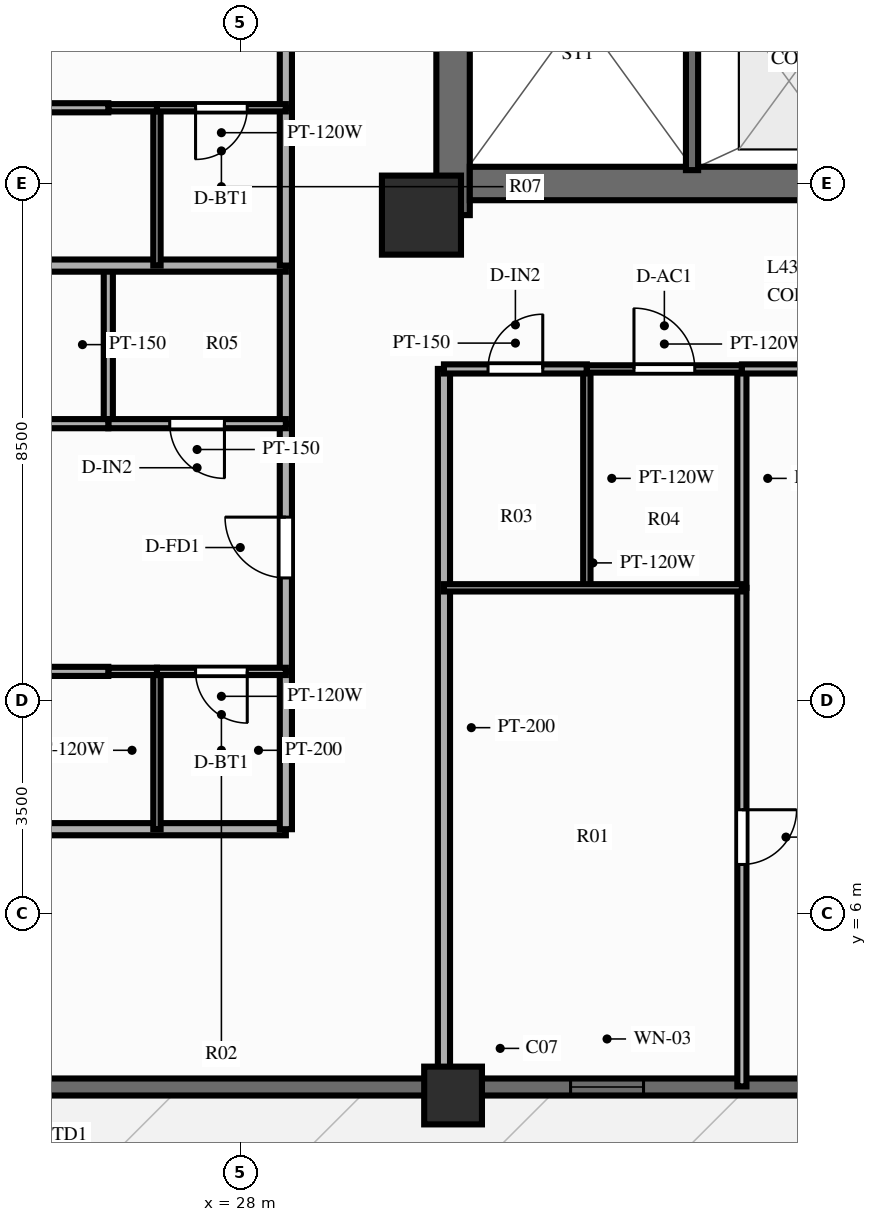
"""IFC4 building model, lengths in metres.
Left out: names, types, materials, properties, quantities, classifications, styles, units other than length and angle.
Written with IfcOpenShell. Run it as: python <this file> out.ifc"""

import sys

from ifc_helpers import new_model, si_unit, direction, frame, frame_2d, origin, origin_2d, place, context, subcontext, project, spatial, rectangle, extrude, source, transform, mapped, element, fill, save


model = new_model("IFC4")
c1 = context("Model", 3, precision=1e-05, world=origin(), true_north=direction((0.0, 1.0)))
c2 = subcontext(c1, "Body", "Model", "MODEL_VIEW")
j1 = project(units=[si_unit("LENGTHUNIT", "METRE"), si_unit("PLANEANGLEUNIT", "RADIAN")], contexts=[c1])
p1 = place(None, origin())
s1 = spatial("IfcSite", under=j1, at=p1, CompositionType="ELEMENT")
p2 = place(p1, origin())
s2 = spatial("IfcBuilding", under=s1, at=p2, CompositionType="ELEMENT")
p3 = place(p2, frame((0.0, 0.0, 135.75)))
s3 = spatial("IfcBuildingStorey", under=s2, at=p3, CompositionType="ELEMENT", Elevation=135.75)
p4 = place(p3, frame((31.5, 17.48, 0.0), z_axis=(0.0, 0.0, 1.0), x_axis=(0.0, 1.0, 0.0)))
e1 = element("IfcWall", 1, at=p4, inside=s3, PredefinedType="SHEAR", context=c2, shape_type="SweptSolid", body=[
    extrude(rectangle(XDim=19.04, YDim=0.55, at=frame_2d((9.52, 0.0))), origin(), (0.0, 0.0, 1.0), 3.0),
])
p5 = place(p4, frame((6.32, 0.0, 0.0)))
e2 = element("IfcOpeningElement", 2, at=p5, cuts=e1, PredefinedType="OPENING", context=c2, shape_type="SweptSolid", body=[
    extrude(rectangle(XDim=1.1, YDim=2.15, at=frame_2d((0.55, 1.075))), frame((0.0, 0.287, 0.0), z_axis=(0.0, -1.0, 0.0), x_axis=(1.0, 0.0, 0.0)), (0.0, 0.0, 1.0), 0.574),
])
p6 = place(p3, frame((31.775, 18.0, 0.0), z_axis=(0.0, 0.0, 1.0), x_axis=(1.0, 0.0, 0.0)))
e3 = element("IfcWall", 3, at=p6, inside=s3, PredefinedType="SHEAR", context=c2, shape_type="SweptSolid", body=[
    extrude(rectangle(XDim=12.45, YDim=0.55, at=frame_2d((6.225, 0.0))), origin(), (0.0, 0.0, 1.0), 3.0),
])
m1 = source(origin(), c2, "Body", "SweptSolid", [
    extrude(rectangle(XDim=1.3, YDim=1.3, at=origin_2d()), origin(), (0.0, 0.0, 1.0), 3.0),
])
p7 = place(p3, frame((30.98, 17.48, 0.0), z_axis=(0.0, 0.0, 1.0), x_axis=(1.0, 0.0, 0.0)))
e4 = element("IfcColumn", 4, at=p7, inside=s3, PredefinedType="COLUMN", context=c2, shape_type="MappedRepresentation", body=[
    mapped(m1, transform((0.0, 0.0, 0.0), scale=1.0)),
])
m2 = source(origin(), c2, "Body", "SweptSolid", [
    extrude(rectangle(XDim=0.95, YDim=0.95, at=origin_2d()), origin(), (0.0, 0.0, 1.0), 3.0),
])
p8 = place(p3, frame((31.5, 3.0, 0.0), z_axis=(0.0, 0.0, 1.0), x_axis=(1.0, 0.0, 0.0)))
e5 = element("IfcColumn", 5, at=p8, inside=s3, PredefinedType="COLUMN", context=c2, shape_type="MappedRepresentation", body=[
    mapped(m2, transform((0.0, 0.0, 0.0), scale=1.0)),
])
p9 = place(p3, frame((16.2, 3.14, 0.0), z_axis=(0.0, 0.0, 1.0), x_axis=(1.0, 0.0, 0.0)))
e6 = element("IfcWall", 6, at=p9, inside=s3, PredefinedType="SOLIDWALL", context=c2, shape_type="SweptSolid", body=[
    extrude(rectangle(XDim=43.6, YDim=0.28, at=frame_2d((21.8, 0.0))), origin(), (0.0, 0.0, 1.0), 2.28),
])
p10 = place(p9, frame((8.2, 0.0, 0.0), z_axis=(0.0, 0.0, 1.0), x_axis=(-1.0, 0.0, 0.0)))
e7 = element("IfcOpeningElement", 7, at=p10, cuts=e6, PredefinedType="OPENING", context=c2, shape_type="SweptSolid", body=[
    extrude(rectangle(XDim=1.1, YDim=2.15, at=frame_2d((0.55, 1.075))), frame((0.0, 0.152, 0.0), z_axis=(0.0, -1.0, 0.0), x_axis=(1.0, 0.0, 0.0)), (0.0, 0.0, 1.0), 0.304),
])
p11 = place(p9, frame((17.232, 0.0, 0.25)))
e8 = element("IfcOpeningElement", 8, at=p11, cuts=e6, PredefinedType="OPENING", context=c2, shape_type="SweptSolid", body=[
    extrude(rectangle(XDim=1.2, YDim=1.5, at=frame_2d((0.6, 0.75))), frame((0.0, 0.152, 0.0), z_axis=(0.0, -1.0, 0.0), x_axis=(1.0, 0.0, 0.0)), (0.0, 0.0, 1.0), 0.304),
])
p12 = place(p9, frame((23.417, 0.0, 0.25)))
e9 = element("IfcOpeningElement", 9, at=p12, cuts=e6, PredefinedType="OPENING", context=c2, shape_type="SweptSolid", body=[
    extrude(rectangle(XDim=1.2, YDim=1.5, at=frame_2d((0.6, 0.75))), frame((0.0, 0.152, 0.0), z_axis=(0.0, -1.0, 0.0), x_axis=(1.0, 0.0, 0.0)), (0.0, 0.0, 1.0), 0.304),
])
p13 = place(p9, frame((35.35, 0.0, 0.25)))
e10 = element("IfcOpeningElement", 10, at=p13, cuts=e6, PredefinedType="OPENING", context=c2, shape_type="SweptSolid", body=[
    extrude(rectangle(XDim=1.2, YDim=1.5, at=frame_2d((0.6, 0.75))), frame((0.0, 0.152, 0.0), z_axis=(0.0, -1.0, 0.0), x_axis=(1.0, 0.0, 0.0)), (0.0, 0.0, 1.0), 0.304),
])
p14 = place(p3, frame((35.43, 18.22, 0.0), z_axis=(0.0, 0.0, 1.0), x_axis=(0.0, 1.0, 0.0)))
e11 = element("IfcWall", 11, at=p14, inside=s3, PredefinedType="SOLIDWALL", context=c2, shape_type="SweptSolid", body=[
    extrude(rectangle(XDim=7.22, YDim=0.2, at=frame_2d((3.61, 0.0))), origin(), (0.0, 0.0, 1.0), 2.79),
])
p15 = place(p14, frame((6.68, 0.0, 0.0), z_axis=(0.0, 0.0, 1.0), x_axis=(-1.0, 0.0, 0.0)))
e12 = element("IfcOpeningElement", 12, at=p15, cuts=e11, PredefinedType="OPENING", context=c2, shape_type="SweptSolid", body=[
    extrude(rectangle(XDim=1.1, YDim=2.15, at=frame_2d((0.55, 1.075))), frame((0.0, 0.112, 0.0), z_axis=(0.0, -1.0, 0.0), x_axis=(1.0, 0.0, 0.0)), (0.0, 0.0, 1.0), 0.224),
])
p16 = place(p3, frame((31.35, 14.95, 0.0), z_axis=(0.0, 0.0, 1.0), x_axis=(0.0, -1.0, 0.0)))
e13 = element("IfcWall", 13, at=p16, inside=s3, PredefinedType="PARTITIONING", context=c2, shape_type="SweptSolid", body=[
    extrude(rectangle(XDim=11.8, YDim=0.2, at=frame_2d((5.9, 0.0))), origin(), (0.0, 0.0, 1.0), 2.34),
])
p17 = place(p3, frame((33.7, 14.95, 0.0), z_axis=(0.0, 0.0, 1.0), x_axis=(0.0, -1.0, 0.0)))
e14 = element("IfcWall", 14, at=p17, inside=s3, PredefinedType="PARTITIONING", context=c2, shape_type="SweptSolid", body=[
    extrude(rectangle(XDim=3.6, YDim=0.12, at=frame_2d((1.8, 0.0))), origin(), (0.0, 0.0, 1.0), 2.79),
])
p18 = place(p3, frame((36.25, 14.95, 0.0), z_axis=(0.0, 0.0, 1.0), x_axis=(0.0, -1.0, 0.0)))
e15 = element("IfcWall", 15, at=p18, inside=s3, PredefinedType="PARTITIONING", context=c2, shape_type="SweptSolid", body=[
    extrude(rectangle(XDim=3.6, YDim=0.15, at=frame_2d((1.8, 0.0))), origin(), (0.0, 0.0, 1.0), 2.79),
])
p19 = place(p3, frame((36.25, 11.35, 0.0), z_axis=(0.0, 0.0, 1.0), x_axis=(0.0, -1.0, 0.0)))
e16 = element("IfcWall", 16, at=p19, inside=s3, PredefinedType="PARTITIONING", context=c2, shape_type="SweptSolid", body=[
    extrude(rectangle(XDim=8.2, YDim=0.15, at=frame_2d((4.1, 0.0))), origin(), (0.0, 0.0, 1.0), 2.79),
])
p20 = place(p19, frame((3.65, 0.0, 0.0)))
e17 = element("IfcOpeningElement", 17, at=p20, cuts=e16, PredefinedType="OPENING", context=c2, shape_type="SweptSolid", body=[
    extrude(rectangle(XDim=0.9, YDim=2.1, at=frame_2d((0.45, 1.05))), frame((0.0, 0.087, 0.0), z_axis=(0.0, -1.0, 0.0), x_axis=(1.0, 0.0, 0.0)), (0.0, 0.0, 1.0), 0.174),
])
p21 = place(p3, frame((31.35, 11.35, 0.0), z_axis=(0.0, 0.0, 1.0), x_axis=(1.0, 0.0, 0.0)))
e18 = element("IfcWall", 18, at=p21, inside=s3, PredefinedType="PARTITIONING", context=c2, shape_type="SweptSolid", body=[
    extrude(rectangle(XDim=4.9, YDim=0.12, at=frame_2d((2.45, 0.0))), origin(), (0.0, 0.0, 1.0), 2.79),
])
p22 = place(p3, frame((31.35, 14.95, 0.0), z_axis=(0.0, 0.0, 1.0), x_axis=(1.0, 0.0, 0.0)))
e19 = element("IfcWall", 19, at=p22, inside=s3, PredefinedType="PARTITIONING", context=c2, shape_type="SweptSolid", body=[
    extrude(rectangle(XDim=2.35, YDim=0.15, at=frame_2d((1.175, 0.0))), origin(), (0.0, 0.0, 1.0), 2.79),
])
p23 = place(p22, frame((0.725, 0.0, 0.0)))
e20 = element("IfcOpeningElement", 20, at=p23, cuts=e19, PredefinedType="OPENING", context=c2, shape_type="SweptSolid", body=[
    extrude(rectangle(XDim=0.9, YDim=2.1, at=frame_2d((0.45, 1.05))), frame((0.0, 0.087, 0.0), z_axis=(0.0, -1.0, 0.0), x_axis=(1.0, 0.0, 0.0)), (0.0, 0.0, 1.0), 0.174),
])
p24 = place(p3, frame((33.7, 14.95, 0.0), z_axis=(0.0, 0.0, 1.0), x_axis=(1.0, 0.0, 0.0)))
e21 = element("IfcWall", 21, at=p24, inside=s3, PredefinedType="PARTITIONING", context=c2, shape_type="SweptSolid", body=[
    extrude(rectangle(XDim=2.55, YDim=0.12, at=frame_2d((1.275, 0.0))), origin(), (0.0, 0.0, 1.0), 2.79),
])
p25 = place(p24, frame((0.775, 0.0, 0.0)))
e22 = element("IfcOpeningElement", 22, at=p25, cuts=e21, PredefinedType="OPENING", context=c2, shape_type="SweptSolid", body=[
    extrude(rectangle(XDim=1.0, YDim=2.1, at=frame_2d((0.5, 1.05))), frame((0.0, 0.072, 0.0), z_axis=(0.0, -1.0, 0.0), x_axis=(1.0, 0.0, 0.0)), (0.0, 0.0, 1.0), 0.144),
])
p26 = place(p3, frame((36.25, 14.95, 0.0), z_axis=(0.0, 0.0, 1.0), x_axis=(1.0, 0.0, 0.0)))
e23 = element("IfcWall", 23, at=p26, inside=s3, PredefinedType="PARTITIONING", context=c2, shape_type="SweptSolid", body=[
    extrude(rectangle(XDim=8.4, YDim=0.15, at=frame_2d((4.2, 0.0))), origin(), (0.0, 0.0, 1.0), 2.79),
])
p27 = place(p26, frame((3.367, 0.0, 0.0)))
e24 = element("IfcOpeningElement", 24, at=p27, cuts=e23, PredefinedType="OPENING", context=c2, shape_type="SweptSolid", body=[
    extrude(rectangle(XDim=1.1, YDim=2.15, at=frame_2d((0.55, 1.075))), frame((0.0, 0.087, 0.0), z_axis=(0.0, -1.0, 0.0), x_axis=(1.0, 0.0, 0.0)), (0.0, 0.0, 1.0), 0.174),
])
p28 = place(p3, frame((28.75, 7.38, 0.0), z_axis=(0.0, 0.0, 1.0), x_axis=(-1.0, 0.0, 0.0)))
e25 = element("IfcWall", 25, at=p28, inside=s3, PredefinedType="PARTITIONING", context=c2, shape_type="SweptSolid", body=[
    extrude(rectangle(XDim=16.6, YDim=0.2, at=frame_2d((8.3, 0.0))), origin(), (0.0, 0.0, 1.0), 2.79),
])
p29 = place(p3, frame((28.75, 7.38, 0.0), z_axis=(0.0, 0.0, 1.0), x_axis=(0.0, 1.0, 0.0)))
e26 = element("IfcWall", 26, at=p29, inside=s3, PredefinedType="PARTITIONING", context=c2, shape_type="SweptSolid", body=[
    extrude(rectangle(XDim=2.596, YDim=0.2, at=frame_2d((1.298, 0.0))), origin(), (0.0, 0.0, 1.0), 2.79),
])
p30 = place(p3, frame((28.75, 9.976, 0.0), z_axis=(0.0, 0.0, 1.0), x_axis=(0.0, 1.0, 0.0)))
e27 = element("IfcWall", 27, at=p30, inside=s3, PredefinedType="PARTITIONING", context=c2, shape_type="SweptSolid", body=[
    extrude(rectangle(XDim=4.074, YDim=0.2, at=frame_2d((2.037, 0.0))), origin(), (0.0, 0.0, 1.0), 2.79),
])
p31 = place(p30, frame((1.537, 0.0, 0.0)))
e28 = element("IfcOpeningElement", 28, at=p31, cuts=e27, PredefinedType="OPENING", context=c2, shape_type="SweptSolid", body=[
    extrude(rectangle(XDim=1.0, YDim=2.15, at=frame_2d((0.5, 1.075))), frame((0.0, 0.112, 0.0), z_axis=(0.0, -1.0, 0.0), x_axis=(1.0, 0.0, 0.0)), (0.0, 0.0, 1.0), 0.224),
])
p32 = place(p3, frame((28.75, 14.05, 0.0), z_axis=(0.0, 0.0, 1.0), x_axis=(0.0, 1.0, 0.0)))
e29 = element("IfcWall", 29, at=p32, inside=s3, PredefinedType="PARTITIONING", context=c2, shape_type="SweptSolid", body=[
    extrude(rectangle(XDim=2.6, YDim=0.2, at=frame_2d((1.3, 0.0))), origin(), (0.0, 0.0, 1.0), 2.79),
])
p33 = place(p3, frame((26.63, 7.38, 0.0), z_axis=(0.0, 0.0, 1.0), x_axis=(0.0, 1.0, 0.0)))
e30 = element("IfcWall", 30, at=p33, inside=s3, PredefinedType="PARTITIONING", context=c2, shape_type="SweptSolid", body=[
    extrude(rectangle(XDim=2.596, YDim=0.12, at=frame_2d((1.298, 0.0))), origin(), (0.0, 0.0, 1.0), 2.79),
])
p34 = place(p3, frame((25.83, 14.05, 0.0), z_axis=(0.0, 0.0, 1.0), x_axis=(0.0, 1.0, 0.0)))
e31 = element("IfcWall", 31, at=p34, inside=s3, PredefinedType="PARTITIONING", context=c2, shape_type="SweptSolid", body=[
    extrude(rectangle(XDim=2.6, YDim=0.15, at=frame_2d((1.3, 0.0))), origin(), (0.0, 0.0, 1.0), 2.79),
])
p35 = place(p3, frame((28.75, 9.976, 0.0), z_axis=(0.0, 0.0, 1.0), x_axis=(-1.0, 0.0, 0.0)))
e32 = element("IfcWall", 32, at=p35, inside=s3, PredefinedType="PARTITIONING", context=c2, shape_type="SweptSolid", body=[
    extrude(rectangle(XDim=2.12, YDim=0.12, at=frame_2d((1.06, 0.0))), origin(), (0.0, 0.0, 1.0), 2.79),
])
p36 = place(p35, frame((0.635, 0.0, 0.0)))
e33 = element("IfcOpeningElement", 33, at=p36, cuts=e32, PredefinedType="OPENING", context=c2, shape_type="SweptSolid", body=[
    extrude(rectangle(XDim=0.85, YDim=2.05, at=frame_2d((0.425, 1.025))), frame((0.0, 0.072, 0.0), z_axis=(0.0, -1.0, 0.0), x_axis=(1.0, 0.0, 0.0)), (0.0, 0.0, 1.0), 0.144),
])
p37 = place(p3, frame((26.63, 9.976, 0.0), z_axis=(0.0, 0.0, 1.0), x_axis=(-1.0, 0.0, 0.0)))
e34 = element("IfcWall", 34, at=p37, inside=s3, PredefinedType="PARTITIONING", context=c2, shape_type="SweptSolid", body=[
    extrude(rectangle(XDim=0.8, YDim=0.12, at=frame_2d((0.4, 0.0))), origin(), (0.0, 0.0, 1.0), 2.79),
])
p38 = place(p3, frame((25.83, 9.976, 0.0), z_axis=(0.0, 0.0, 1.0), x_axis=(-1.0, 0.0, 0.0)))
e35 = element("IfcWall", 35, at=p38, inside=s3, PredefinedType="PARTITIONING", context=c2, shape_type="SweptSolid", body=[
    extrude(rectangle(XDim=13.68, YDim=0.15, at=frame_2d((6.84, 0.0))), origin(), (0.0, 0.0, 1.0), 2.79),
])
p39 = place(p38, frame((5.877, 0.0, 0.0)))
e36 = element("IfcOpeningElement", 36, at=p39, cuts=e35, PredefinedType="OPENING", context=c2, shape_type="SweptSolid", body=[
    extrude(rectangle(XDim=0.9, YDim=2.1, at=frame_2d((0.45, 1.05))), frame((0.0, 0.087, 0.0), z_axis=(0.0, -1.0, 0.0), x_axis=(1.0, 0.0, 0.0)), (0.0, 0.0, 1.0), 0.174),
])
p40 = place(p3, frame((28.75, 14.05, 0.0), z_axis=(0.0, 0.0, 1.0), x_axis=(-1.0, 0.0, 0.0)))
e37 = element("IfcWall", 37, at=p40, inside=s3, PredefinedType="PARTITIONING", context=c2, shape_type="SweptSolid", body=[
    extrude(rectangle(XDim=2.92, YDim=0.15, at=frame_2d((1.46, 0.0))), origin(), (0.0, 0.0, 1.0), 2.79),
])
p41 = place(p40, frame((1.01, 0.0, 0.0)))
e38 = element("IfcOpeningElement", 38, at=p41, cuts=e37, PredefinedType="OPENING", context=c2, shape_type="SweptSolid", body=[
    extrude(rectangle(XDim=0.9, YDim=2.1, at=frame_2d((0.45, 1.05))), frame((0.0, 0.087, 0.0), z_axis=(0.0, -1.0, 0.0), x_axis=(1.0, 0.0, 0.0)), (0.0, 0.0, 1.0), 0.174),
])
p42 = place(p3, frame((25.83, 14.05, 0.0), z_axis=(0.0, 0.0, 1.0), x_axis=(-1.0, 0.0, 0.0)))
e39 = element("IfcWall", 39, at=p42, inside=s3, PredefinedType="PARTITIONING", context=c2, shape_type="SweptSolid", body=[
    extrude(rectangle(XDim=13.68, YDim=0.15, at=frame_2d((6.84, 0.0))), origin(), (0.0, 0.0, 1.0), 2.79),
])
p43 = place(p42, frame((5.877, 0.0, 0.0)))
e40 = element("IfcOpeningElement", 40, at=p43, cuts=e39, PredefinedType="OPENING", context=c2, shape_type="SweptSolid", body=[
    extrude(rectangle(XDim=0.9, YDim=2.1, at=frame_2d((0.45, 1.05))), frame((0.0, 0.087, 0.0), z_axis=(0.0, -1.0, 0.0), x_axis=(1.0, 0.0, 0.0)), (0.0, 0.0, 1.0), 0.174),
])
p44 = place(p3, frame((28.75, 16.65, 0.0), z_axis=(0.0, 0.0, 1.0), x_axis=(-1.0, 0.0, 0.0)))
e41 = element("IfcWall", 41, at=p44, inside=s3, PredefinedType="PARTITIONING", context=c2, shape_type="SweptSolid", body=[
    extrude(rectangle(XDim=16.6, YDim=0.2, at=frame_2d((8.3, 0.0))), origin(), (0.0, 0.0, 1.0), 2.79),
])
p45 = place(p3, frame((28.75, 16.65, 0.0), z_axis=(0.0, 0.0, 1.0), x_axis=(0.0, 1.0, 0.0)))
e42 = element("IfcWall", 42, at=p45, inside=s3, PredefinedType="PARTITIONING", context=c2, shape_type="SweptSolid", body=[
    extrude(rectangle(XDim=2.596, YDim=0.2, at=frame_2d((1.298, 0.0))), origin(), (0.0, 0.0, 1.0), 2.79),
])
p46 = place(p3, frame((28.75, 19.246, 0.0), z_axis=(0.0, 0.0, 1.0), x_axis=(0.0, 1.0, 0.0)))
e43 = element("IfcWall", 43, at=p46, inside=s3, PredefinedType="PARTITIONING", context=c2, shape_type="SweptSolid", body=[
    extrude(rectangle(XDim=4.074, YDim=0.2, at=frame_2d((2.037, 0.0))), origin(), (0.0, 0.0, 1.0), 2.79),
])
p47 = place(p46, frame((1.537, 0.0, 0.0)))
e44 = element("IfcOpeningElement", 44, at=p47, cuts=e43, PredefinedType="OPENING", context=c2, shape_type="SweptSolid", body=[
    extrude(rectangle(XDim=1.0, YDim=2.15, at=frame_2d((0.5, 1.075))), frame((0.0, 0.112, 0.0), z_axis=(0.0, -1.0, 0.0), x_axis=(1.0, 0.0, 0.0)), (0.0, 0.0, 1.0), 0.224),
])
p48 = place(p3, frame((26.63, 16.65, 0.0), z_axis=(0.0, 0.0, 1.0), x_axis=(0.0, 1.0, 0.0)))
e45 = element("IfcWall", 45, at=p48, inside=s3, PredefinedType="PARTITIONING", context=c2, shape_type="SweptSolid", body=[
    extrude(rectangle(XDim=2.596, YDim=0.12, at=frame_2d((1.298, 0.0))), origin(), (0.0, 0.0, 1.0), 2.79),
])
p49 = place(p3, frame((28.75, 19.246, 0.0), z_axis=(0.0, 0.0, 1.0), x_axis=(-1.0, 0.0, 0.0)))
e46 = element("IfcWall", 46, at=p49, inside=s3, PredefinedType="PARTITIONING", context=c2, shape_type="SweptSolid", body=[
    extrude(rectangle(XDim=2.12, YDim=0.12, at=frame_2d((1.06, 0.0))), origin(), (0.0, 0.0, 1.0), 2.79),
])
p50 = place(p49, frame((0.635, 0.0, 0.0)))
e47 = element("IfcOpeningElement", 47, at=p50, cuts=e46, PredefinedType="OPENING", context=c2, shape_type="SweptSolid", body=[
    extrude(rectangle(XDim=0.85, YDim=2.05, at=frame_2d((0.425, 1.025))), frame((0.0, 0.072, 0.0), z_axis=(0.0, -1.0, 0.0), x_axis=(1.0, 0.0, 0.0)), (0.0, 0.0, 1.0), 0.144),
])
p51 = place(p3, frame((26.63, 19.246, 0.0), z_axis=(0.0, 0.0, 1.0), x_axis=(-1.0, 0.0, 0.0)))
e48 = element("IfcWall", 48, at=p51, inside=s3, PredefinedType="PARTITIONING", context=c2, shape_type="SweptSolid", body=[
    extrude(rectangle(XDim=0.8, YDim=0.12, at=frame_2d((0.4, 0.0))), origin(), (0.0, 0.0, 1.0), 2.79),
])
p52 = place(p3, frame((25.83, 19.246, 0.0), z_axis=(0.0, 0.0, 1.0), x_axis=(-1.0, 0.0, 0.0)))
e49 = element("IfcWall", 49, at=p52, inside=s3, PredefinedType="PARTITIONING", context=c2, shape_type="SweptSolid", body=[
    extrude(rectangle(XDim=13.68, YDim=0.15, at=frame_2d((6.84, 0.0))), origin(), (0.0, 0.0, 1.0), 2.79),
])
p53 = place(p52, frame((5.877, 0.0, 0.0)))
e50 = element("IfcOpeningElement", 50, at=p53, cuts=e49, PredefinedType="OPENING", context=c2, shape_type="SweptSolid", body=[
    extrude(rectangle(XDim=0.9, YDim=2.1, at=frame_2d((0.45, 1.05))), frame((0.0, 0.087, 0.0), z_axis=(0.0, -1.0, 0.0), x_axis=(1.0, 0.0, 0.0)), (0.0, 0.0, 1.0), 0.174),
])
m3 = source(origin(), c2, "Body", "SweptSolid", [
    extrude(rectangle(XDim=1.2, YDim=1.5, at=frame_2d((0.6, 0.75))), frame((0.0, 0.03, 0.0), z_axis=(0.0, -1.0, 0.0), x_axis=(1.0, 0.0, 0.0)), (0.0, 0.0, 1.0), 0.06),
])
p54 = place(p11, origin())
e51 = element("IfcWindow", 51, at=p54, inside=s3, PartitioningType="SINGLE_PANEL", PredefinedType="WINDOW", context=c2, shape_type="MappedRepresentation", body=[
    mapped(m3, transform((0.0, 0.0, 0.0), scale=1.0)),
])
fill(e8, e51)
m4 = source(origin(), c2, "Body", "SweptSolid", [
    extrude(rectangle(XDim=0.9, YDim=2.1, at=frame_2d((0.45, 1.05))), frame((0.0, 0.025, 0.0), z_axis=(0.0, -1.0, 0.0), x_axis=(1.0, 0.0, 0.0)), (0.0, 0.0, 1.0), 0.05),
])
p55 = place(p20, origin())
e52 = element("IfcDoor", 52, at=p55, inside=s3, OperationType="SINGLE_SWING_LEFT", PredefinedType="DOOR", context=c2, shape_type="MappedRepresentation", body=[
    mapped(m4, transform((0.0, 0.0, 0.0), scale=1.0)),
])
fill(e17, e52)
p56 = place(p23, origin())
e53 = element("IfcDoor", 53, at=p56, inside=s3, OperationType="SINGLE_SWING_RIGHT", PredefinedType="DOOR", context=c2, shape_type="MappedRepresentation", body=[
    mapped(m4, transform((0.0, 0.0, 0.0), scale=1.0)),
])
fill(e20, e53)
m5 = source(origin(), c2, "Body", "SweptSolid", [
    extrude(rectangle(XDim=1.0, YDim=2.1, at=frame_2d((0.5, 1.05))), frame((0.0, 0.025, 0.0), z_axis=(0.0, -1.0, 0.0), x_axis=(1.0, 0.0, 0.0)), (0.0, 0.0, 1.0), 0.05),
])
p57 = place(p25, origin())
e54 = element("IfcDoor", 54, at=p57, inside=s3, OperationType="SINGLE_SWING_LEFT", PredefinedType="DOOR", context=c2, shape_type="MappedRepresentation", body=[
    mapped(m5, transform((0.0, 0.0, 0.0), scale=1.0)),
])
fill(e22, e54)
m6 = source(origin(), c2, "Body", "SweptSolid", [
    extrude(rectangle(XDim=1.0, YDim=2.15, at=frame_2d((0.5, 1.075))), frame((0.0, 0.025, 0.0), z_axis=(0.0, -1.0, 0.0), x_axis=(1.0, 0.0, 0.0)), (0.0, 0.0, 1.0), 0.05),
])
p58 = place(p31, origin())
e55 = element("IfcDoor", 55, at=p58, inside=s3, OperationType="SINGLE_SWING_RIGHT", PredefinedType="DOOR", context=c2, shape_type="MappedRepresentation", body=[
    mapped(m6, transform((0.0, 0.0, 0.0), scale=1.0)),
])
fill(e28, e55)
m7 = source(origin(), c2, "Body", "SweptSolid", [
    extrude(rectangle(XDim=0.85, YDim=2.05, at=frame_2d((0.425, 1.025))), frame((0.0, 0.025, 0.0), z_axis=(0.0, -1.0, 0.0), x_axis=(1.0, 0.0, 0.0)), (0.0, 0.0, 1.0), 0.05),
])
p59 = place(p36, origin())
e56 = element("IfcDoor", 56, at=p59, inside=s3, OperationType="SINGLE_SWING_LEFT", PredefinedType="DOOR", context=c2, shape_type="MappedRepresentation", body=[
    mapped(m7, transform((0.0, 0.0, 0.0), scale=1.0)),
])
fill(e33, e56)
p60 = place(p41, origin())
e57 = element("IfcDoor", 57, at=p60, inside=s3, OperationType="SINGLE_SWING_LEFT", PredefinedType="DOOR", context=c2, shape_type="MappedRepresentation", body=[
    mapped(m4, transform((0.0, 0.0, 0.0), scale=1.0)),
])
fill(e38, e57)
p61 = place(p50, origin())
e58 = element("IfcDoor", 58, at=p61, inside=s3, OperationType="SINGLE_SWING_RIGHT", PredefinedType="DOOR", context=c2, shape_type="MappedRepresentation", body=[
    mapped(m7, transform((0.0, 0.0, 0.0), scale=1.0)),
])
fill(e47, e58)
save(model, sys.argv[1])
